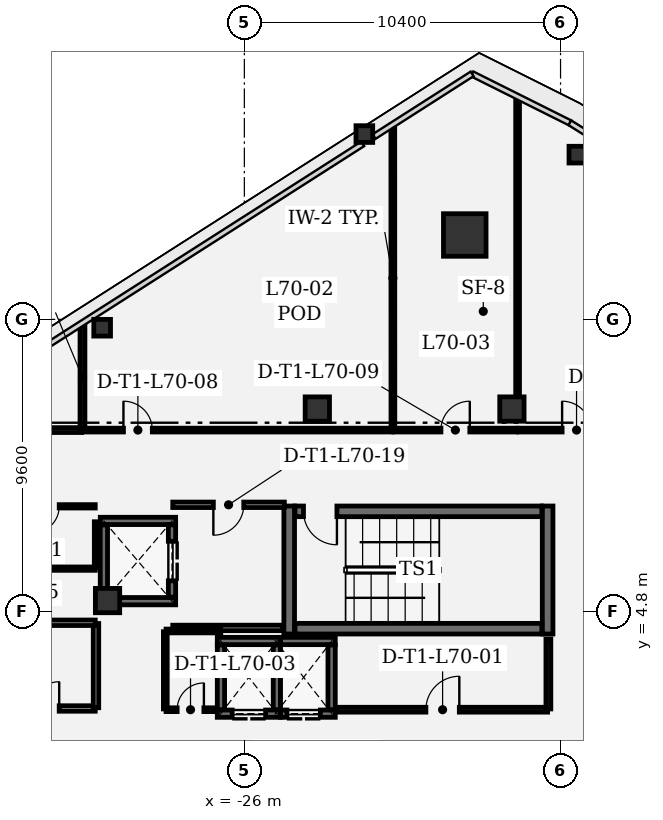
"""IFC4 building model, lengths in metres.
Left out: names, types, materials, properties, quantities, classifications, styles, units other than length and angle.
Written with IfcOpenShell. Run it as: python <this file> out.ifc"""

import sys

from ifc_helpers import new_model, si_unit, direction, frame, frame_2d, origin, origin_2d, place, context, subcontext, project, spatial, rectangle, extrude, element, fill, save


model = new_model("IFC4")
c1 = context("Model", 3, precision=1e-05, world=origin(), true_north=direction((0.0, 1.0)))
c2 = subcontext(c1, "Body", "Model", "MODEL_VIEW")
j1 = project(units=[si_unit("LENGTHUNIT", "METRE"), si_unit("PLANEANGLEUNIT", "RADIAN")], contexts=[c1])
p1 = place(None, origin())
s1 = spatial("IfcSite", under=j1, at=p1, CompositionType="ELEMENT")
p2 = place(p1, origin())
s2 = spatial("IfcBuilding", under=s1, at=p2, CompositionType="ELEMENT")
p3 = place(p2, frame((0.0, 0.0, 301.8)))
s3 = spatial("IfcBuildingStorey", under=s2, at=p3, CompositionType="ELEMENT", Elevation=301.8)
p4 = place(p3, frame((-18.75, 17.176, 0.0), z_axis=(0.0, 0.0, 1.0), x_axis=(1.0, 0.0, 0.0)))
e1 = element("IfcColumn", 1, at=p4, inside=s3, PredefinedType="COLUMN", context=c2, shape_type="SweptSolid", body=[
    extrude(rectangle(XDim=1.4, YDim=1.4, at=origin_2d()), origin(), (0.0, 0.0, 1.0), 4.2),
])
for number, where, z_axis, x_axis in (
    (2, (-23.6, 11.45, 0.0), (0.0, 0.0, 1.0), (1.0, 0.0, 0.0)),
    (3, (-17.2, 11.45, 0.0), (0.0, 0.0, 1.0), (1.0, 0.0, 0.0)),
    (4, (-30.5, 5.15, 0.0), (0.0, 0.0, 1.0), (1.0, 0.0, 0.0)),
):
    element("IfcColumn", number, at=place(p3, frame(where, z_axis=z_axis, x_axis=x_axis)), inside=s3, PredefinedType="COLUMN", context=c2, shape_type="SweptSolid", body=[
        extrude(rectangle(XDim=0.8, YDim=0.8, at=origin_2d()), origin(), (0.0, 0.0, 1.0), 4.2),
    ])
for number, where, z_axis, x_axis in (
    (5, (-22.053, 20.495, 0.0), (0.0, 0.0, 1.0), (1.0, 0.0, 0.0)),
    (6, (-30.677, 14.124, 0.0), (0.0, 0.0, 1.0), (1.0, 0.0, 0.0)),
    (7, (-15.046, 19.818, 0.0), (0.0, 0.0, 1.0), (1.0, 0.0, 0.0)),
):
    element("IfcColumn", number, at=place(p3, frame(where, z_axis=z_axis, x_axis=x_axis)), inside=s3, PredefinedType="COLUMN", context=c2, shape_type="SweptSolid", body=[
        extrude(rectangle(XDim=0.55, YDim=0.55, at=origin_2d()), origin(), (0.0, 0.0, 1.0), 4.2),
    ])
for number, where, z_axis, x_axis in (
    (8, (-24.525, 8.26, 0.0), (0.0, 0.0, 1.0), (0.0, -1.0, 0.0)),
    (9, (-16.025, 4.05, 0.0), (0.0, 0.0, 1.0), (0.0, 1.0, 0.0)),
):
    element("IfcWall", number, at=place(p3, frame(where, z_axis=z_axis, x_axis=x_axis)), inside=s3, PredefinedType="SHEAR", context=c2, shape_type="SweptSolid", body=[
        extrude(rectangle(XDim=4.21, YDim=0.35, at=frame_2d((2.105, 0.0))), origin(), (0.0, 0.0, 1.0), 3.91),
    ])
p5 = place(p3, frame((-24.335, 4.225, 0.0), z_axis=(0.0, 0.0, 1.0), x_axis=(1.0, 0.0, 0.0)))
e10 = element("IfcWall", 10, at=p5, inside=s3, PredefinedType="SHEAR", context=c2, shape_type="SweptSolid", body=[
    extrude(rectangle(XDim=8.12, YDim=0.35, at=frame_2d((4.06, 0.0))), origin(), (0.0, 0.0, 1.0), 3.91),
])
p6 = place(p3, frame((-16.215, 8.085, 0.0), z_axis=(0.0, 0.0, 1.0), x_axis=(-1.0, 0.0, 0.0)))
e11 = element("IfcWall", 11, at=p6, inside=s3, PredefinedType="SHEAR", context=c2, shape_type="SweptSolid", body=[
    extrude(rectangle(XDim=8.12, YDim=0.35, at=frame_2d((4.06, 0.0))), origin(), (0.0, 0.0, 1.0), 3.91),
])
p7 = place(p6, frame((6.74, 0.0, 0.0)))
e12 = element("IfcOpeningElement", 12, at=p7, cuts=e11, PredefinedType="OPENING", context=c2, shape_type="SweptSolid", body=[
    extrude(rectangle(XDim=1.1, YDim=2.2, at=frame_2d((0.55, 1.1))), frame((0.0, 0.185, 0.0), z_axis=(0.0, -1.0, 0.0), x_axis=(1.0, 0.0, 0.0)), (0.0, 0.0, 1.0), 0.37),
])
for number, where, z_axis, x_axis in (
    (13, (-28.26, 5.13, 0.0), (0.0, 0.0, 1.0), (-1.0, 0.0, 0.0)),
    (14, (-30.74, 7.77, 0.0), (0.0, 0.0, 1.0), (1.0, 0.0, 0.0)),
):
    element("IfcWall", number, at=place(p3, frame(where, z_axis=z_axis, x_axis=x_axis)), inside=s3, PredefinedType="SHEAR", context=c2, shape_type="SweptSolid", body=[
        extrude(rectangle(XDim=2.48, YDim=0.24, at=frame_2d((1.24, 0.0))), origin(), (0.0, 0.0, 1.0), 3.91),
    ])
p8 = place(p3, frame((-30.62, 5.262, 0.0), z_axis=(0.0, 0.0, 1.0), x_axis=(0.0, 1.0, 0.0)))
e15 = element("IfcWall", 15, at=p8, inside=s3, PredefinedType="SHEAR", context=c2, shape_type="SweptSolid", body=[
    extrude(rectangle(XDim=2.376, YDim=0.24, at=frame_2d((1.188, 0.0))), origin(), (0.0, 0.0, 1.0), 3.91),
])
p9 = place(p3, frame((-28.38, 7.638, 0.0), z_axis=(0.0, 0.0, 1.0), x_axis=(0.0, -1.0, 0.0)))
e16 = element("IfcWall", 16, at=p9, inside=s3, PredefinedType="SHEAR", context=c2, shape_type="SweptSolid", body=[
    extrude(rectangle(XDim=2.376, YDim=0.24, at=frame_2d((1.188, 0.0))), origin(), (0.0, 0.0, 1.0), 3.91),
])
p10 = place(p9, frame((0.538, 0.0, 0.0)))
e17 = element("IfcOpeningElement", 17, at=p10, cuts=e16, PredefinedType="OPENING", context=c2, shape_type="SweptSolid", body=[
    extrude(rectangle(XDim=1.3, YDim=2.3, at=frame_2d((0.65, 1.15))), frame((0.0, 0.13, 0.0), z_axis=(0.0, -1.0, 0.0), x_axis=(1.0, 0.0, 0.0)), (0.0, 0.0, 1.0), 0.26),
])
p11 = place(p3, frame((-24.81, 1.43, 0.0), z_axis=(0.0, 0.0, 1.0), x_axis=(-1.0, 0.0, 0.0)))
e18 = element("IfcWall", 18, at=p11, inside=s3, PredefinedType="SHEAR", context=c2, shape_type="SweptSolid", body=[
    extrude(rectangle(XDim=2.08, YDim=0.24, at=frame_2d((1.04, 0.0))), origin(), (0.0, 0.0, 1.0), 3.91),
])
p12 = place(p11, frame((0.49, 0.0, 0.0)))
e19 = element("IfcOpeningElement", 19, at=p12, cuts=e18, PredefinedType="OPENING", context=c2, shape_type="SweptSolid", body=[
    extrude(rectangle(XDim=1.1, YDim=2.2, at=frame_2d((0.55, 1.1))), frame((0.0, 0.13, 0.0), z_axis=(0.0, -1.0, 0.0), x_axis=(1.0, 0.0, 0.0)), (0.0, 0.0, 1.0), 0.26),
])
p13 = place(p3, frame((-26.89, 3.82, 0.0), z_axis=(0.0, 0.0, 1.0), x_axis=(1.0, 0.0, 0.0)))
e20 = element("IfcWall", 20, at=p13, inside=s3, PredefinedType="SHEAR", context=c2, shape_type="SweptSolid", body=[
    extrude(rectangle(XDim=2.08, YDim=0.24, at=frame_2d((1.04, 0.0))), origin(), (0.0, 0.0, 1.0), 3.91),
])
for number, where, z_axis, x_axis in (
    (21, (-26.77, 1.562, 0.0), (0.0, 0.0, 1.0), (0.0, 1.0, 0.0)),
    (22, (-24.93, 3.688, 0.0), (0.0, 0.0, 1.0), (0.0, -1.0, 0.0)),
):
    element("IfcWall", number, at=place(p3, frame(where, z_axis=z_axis, x_axis=x_axis)), inside=s3, PredefinedType="SHEAR", context=c2, shape_type="SweptSolid", body=[
        extrude(rectangle(XDim=2.126, YDim=0.24, at=frame_2d((1.063, 0.0))), origin(), (0.0, 0.0, 1.0), 3.91),
    ])
p14 = place(p3, frame((-23.01, 1.43, 0.0), z_axis=(0.0, 0.0, 1.0), x_axis=(-1.0, 0.0, 0.0)))
e23 = element("IfcWall", 23, at=p14, inside=s3, PredefinedType="SHEAR", context=c2, shape_type="SweptSolid", body=[
    extrude(rectangle(XDim=1.8, YDim=0.24, at=frame_2d((0.9, 0.0))), origin(), (0.0, 0.0, 1.0), 3.91),
])
p15 = place(p14, frame((0.49, 0.0, 0.0)))
e24 = element("IfcOpeningElement", 24, at=p15, cuts=e23, PredefinedType="OPENING", context=c2, shape_type="SweptSolid", body=[
    extrude(rectangle(XDim=1.1, YDim=2.2, at=frame_2d((0.55, 1.1))), frame((0.0, 0.13, 0.0), z_axis=(0.0, -1.0, 0.0), x_axis=(1.0, 0.0, 0.0)), (0.0, 0.0, 1.0), 0.26),
])
p16 = place(p3, frame((-24.81, 3.82, 0.0), z_axis=(0.0, 0.0, 1.0), x_axis=(1.0, 0.0, 0.0)))
e25 = element("IfcWall", 25, at=p16, inside=s3, PredefinedType="SHEAR", context=c2, shape_type="SweptSolid", body=[
    extrude(rectangle(XDim=1.8, YDim=0.24, at=frame_2d((0.9, 0.0))), origin(), (0.0, 0.0, 1.0), 3.91),
])
p17 = place(p3, frame((-23.13, 3.688, 0.0), z_axis=(0.0, 0.0, 1.0), x_axis=(0.0, -1.0, 0.0)))
e26 = element("IfcWall", 26, at=p17, inside=s3, PredefinedType="SHEAR", context=c2, shape_type="SweptSolid", body=[
    extrude(rectangle(XDim=2.126, YDim=0.24, at=frame_2d((1.063, 0.0))), origin(), (0.0, 0.0, 1.0), 3.91),
])
p18 = place(p3, frame((-28.355, 4.25, 0.0), z_axis=(0.0, 0.0, 1.0), x_axis=(1.0, 0.0, 0.0)))
e27 = element("IfcWall", 27, at=p18, inside=s3, PredefinedType="PARTITIONING", context=c2, shape_type="SweptSolid", body=[
    extrude(rectangle(XDim=3.622, YDim=0.18, at=frame_2d((1.811, 0.0))), origin(), (0.0, 0.0, 1.0), 3.91),
])
p19 = place(p3, frame((-24.684, 8.3, 0.0), z_axis=(0.0, 0.0, 1.0), x_axis=(-1.0, 0.0, 0.0)))
e28 = element("IfcWall", 28, at=p19, inside=s3, PredefinedType="PARTITIONING", context=c2, shape_type="SweptSolid", body=[
    extrude(rectangle(XDim=3.671, YDim=0.18, at=frame_2d((1.835, 0.0))), origin(), (0.0, 0.0, 1.0), 3.529),
])
p20 = place(p19, frame((1.335, 0.0, 0.0)))
e29 = element("IfcOpeningElement", 29, at=p20, cuts=e28, PredefinedType="OPENING", context=c2, shape_type="SweptSolid", body=[
    extrude(rectangle(XDim=1.0, YDim=2.15, at=frame_2d((0.5, 1.075))), frame((0.0, 0.1, 0.0), z_axis=(0.0, -1.0, 0.0), x_axis=(1.0, 0.0, 0.0)), (0.0, 0.0, 1.0), 0.2),
])
p21 = place(p3, frame((-34.155, 6.2, 0.0), z_axis=(0.0, 0.0, 1.0), x_axis=(1.0, 0.0, 0.0)))
e30 = element("IfcWall", 30, at=p21, inside=s3, PredefinedType="PARTITIONING", context=c2, shape_type="SweptSolid", body=[
    extrude(rectangle(XDim=3.25, YDim=0.11, at=frame_2d((1.625, 0.0))), origin(), (0.0, 0.0, 1.0), 3.529),
])
p22 = place(p3, frame((-30.88, 6.225, 0.0), z_axis=(0.0, 0.0, 1.0), x_axis=(0.0, 1.0, 0.0)))
e31 = element("IfcWall", 31, at=p22, inside=s3, PredefinedType="PARTITIONING", context=c2, shape_type="SweptSolid", body=[
    extrude(rectangle(XDim=1.518, YDim=0.11, at=frame_2d((0.759, 0.0))), origin(), (0.0, 0.0, 1.0), 3.91),
])
p23 = place(p3, frame((-30.905, 8.25, 0.0), z_axis=(0.0, 0.0, 1.0), x_axis=(-1.0, 0.0, 0.0)))
e32 = element("IfcWall", 32, at=p23, inside=s3, PredefinedType="PARTITIONING", context=c2, shape_type="SweptSolid", body=[
    extrude(rectangle(XDim=3.25, YDim=0.11, at=frame_2d((1.625, 0.0))), origin(), (0.0, 0.0, 1.0), 3.13),
])
p24 = place(p23, frame((1.185, 0.0, 0.0)))
e33 = element("IfcOpeningElement", 33, at=p24, cuts=e32, PredefinedType="OPENING", context=c2, shape_type="SweptSolid", body=[
    extrude(rectangle(XDim=0.88, YDim=2.1, at=frame_2d((0.44, 1.05))), frame((0.0, 0.065, 0.0), z_axis=(0.0, -1.0, 0.0), x_axis=(1.0, 0.0, 0.0)), (0.0, 0.0, 1.0), 0.13),
])
p25 = place(p3, frame((-22.934, 1.56, 0.0), z_axis=(0.0, 0.0, 1.0), x_axis=(1.0, 0.0, 0.0)))
e34 = element("IfcWall", 34, at=p25, inside=s3, PredefinedType="PARTITIONING", context=c2, shape_type="SweptSolid", body=[
    extrude(rectangle(XDim=6.909, YDim=0.16, at=frame_2d((3.455, 0.0))), origin(), (0.0, 0.0, 1.0), 3.91),
])
p26 = place(p25, frame((2.905, 0.0, 0.0)))
e35 = element("IfcOpeningElement", 35, at=p26, cuts=e34, PredefinedType="OPENING", context=c2, shape_type="SweptSolid", body=[
    extrude(rectangle(XDim=1.1, YDim=2.15, at=frame_2d((0.55, 1.075))), frame((0.0, 0.09, 0.0), z_axis=(0.0, -1.0, 0.0), x_axis=(1.0, 0.0, 0.0)), (0.0, 0.0, 1.0), 0.18),
])
p27 = place(p3, frame((-16.0, 1.585, 0.0), z_axis=(0.0, 0.0, 1.0), x_axis=(0.0, 1.0, 0.0)))
e36 = element("IfcWall", 36, at=p27, inside=s3, PredefinedType="PARTITIONING", context=c2, shape_type="SweptSolid", body=[
    extrude(rectangle(XDim=2.302, YDim=0.16, at=frame_2d((1.151, 0.0))), origin(), (0.0, 0.0, 1.0), 3.91),
])
p28 = place(p3, frame((-28.6, 4.125, 0.0), z_axis=(0.0, 0.0, 1.0), x_axis=(0.0, -1.0, 0.0)))
e37 = element("IfcWall", 37, at=p28, inside=s3, PredefinedType="PARTITIONING", context=c2, shape_type="SweptSolid", body=[
    extrude(rectangle(XDim=2.54, YDim=0.125, at=frame_2d((1.27, 0.0))), origin(), (0.0, 0.0, 1.0), 3.91),
])
p29 = place(p3, frame((-28.575, 1.56, 0.0), z_axis=(0.0, 0.0, 1.0), x_axis=(1.0, 0.0, 0.0)))
e38 = element("IfcWall", 38, at=p29, inside=s3, PredefinedType="PARTITIONING", context=c2, shape_type="SweptSolid", body=[
    extrude(rectangle(XDim=1.609, YDim=0.125, at=frame_2d((0.805, 0.0))), origin(), (0.0, 0.0, 1.0), 3.91),
])
p30 = place(p29, frame((0.365, 0.0, 0.0)))
e39 = element("IfcOpeningElement", 39, at=p30, cuts=e38, PredefinedType="OPENING", context=c2, shape_type="SweptSolid", body=[
    extrude(rectangle(XDim=0.88, YDim=2.1, at=frame_2d((0.44, 1.05))), frame((0.0, 0.073, 0.0), z_axis=(0.0, -1.0, 0.0), x_axis=(1.0, 0.0, 0.0)), (0.0, 0.0, 1.0), 0.145),
])
p31 = place(p3, frame((-26.775, 4.15, 0.0), z_axis=(0.0, 0.0, 1.0), x_axis=(-1.0, 0.0, 0.0)))
e40 = element("IfcWall", 40, at=p31, inside=s3, PredefinedType="PARTITIONING", context=c2, shape_type="SweptSolid", body=[
    extrude(rectangle(XDim=1.8, YDim=0.125, at=frame_2d((0.9, 0.0))), origin(), (0.0, 0.0, 1.0), 3.91),
])
p32 = place(p3, frame((-34.155, 1.6, 0.0), z_axis=(0.0, 0.0, 1.0), x_axis=(1.0, 0.0, 0.0)))
e41 = element("IfcWall", 41, at=p32, inside=s3, PredefinedType="PARTITIONING", context=c2, shape_type="SweptSolid", body=[
    extrude(rectangle(XDim=3.25, YDim=0.18, at=frame_2d((1.625, 0.0))), origin(), (0.0, 0.0, 1.0), 3.91),
])
p33 = place(p32, frame((1.185, 0.0, 0.0)))
e42 = element("IfcOpeningElement", 42, at=p33, cuts=e41, PredefinedType="OPENING", context=c2, shape_type="SweptSolid", body=[
    extrude(rectangle(XDim=0.88, YDim=2.1, at=frame_2d((0.44, 1.05))), frame((0.0, 0.1, 0.0), z_axis=(0.0, -1.0, 0.0), x_axis=(1.0, 0.0, 0.0)), (0.0, 0.0, 1.0), 0.2),
])
p34 = place(p3, frame((-30.88, 1.625, 0.0), z_axis=(0.0, 0.0, 1.0), x_axis=(0.0, 1.0, 0.0)))
e43 = element("IfcWall", 43, at=p34, inside=s3, PredefinedType="PARTITIONING", context=c2, shape_type="SweptSolid", body=[
    extrude(rectangle(XDim=2.77, YDim=0.18, at=frame_2d((1.385, 0.0))), origin(), (0.0, 0.0, 1.0), 3.91),
])
p35 = place(p3, frame((-30.905, 4.42, 0.0), z_axis=(0.0, 0.0, 1.0), x_axis=(-1.0, 0.0, 0.0)))
e44 = element("IfcWall", 44, at=p35, inside=s3, PredefinedType="PARTITIONING", context=c2, shape_type="SweptSolid", body=[
    extrude(rectangle(XDim=1.975, YDim=0.18, at=frame_2d((0.988, 0.0))), origin(), (0.0, 0.0, 1.0), 3.91),
])
p36 = place(p3, frame((-31.35, 10.758, 0.0), z_axis=(0.0, 0.0, 1.0), x_axis=(-1.0, 0.0, 0.0)))
e45 = element("IfcWall", 45, at=p36, inside=s3, PredefinedType="PARTITIONING", context=c2, shape_type="SweptSolid", body=[
    extrude(rectangle(XDim=5.41, YDim=0.16, at=frame_2d((2.705, 0.0))), origin(), (0.0, 0.0, 1.0), 3.91),
])
p37 = place(p36, frame((2.155, 0.0, 0.0)))
e46 = element("IfcOpeningElement", 46, at=p37, cuts=e45, PredefinedType="OPENING", context=c2, shape_type="SweptSolid", body=[
    extrude(rectangle(XDim=1.1, YDim=2.15, at=frame_2d((0.55, 1.075))), frame((0.0, 0.09, 0.0), z_axis=(0.0, -1.0, 0.0), x_axis=(1.0, 0.0, 0.0)), (0.0, 0.0, 1.0), 0.18),
])
p38 = place(p3, frame((-31.324, 10.783, 0.0), z_axis=(0.0, 0.0, 1.0), x_axis=(0.0, 1.0, 0.0)))
e47 = element("IfcWall", 47, at=p38, inside=s3, PredefinedType="PARTITIONING", context=c2, shape_type="SweptSolid", body=[
    extrude(rectangle(XDim=3.42, YDim=0.16, at=frame_2d((1.71, 0.0))), origin(), (0.0, 0.0, 1.0), 3.91),
])
p39 = place(p3, frame((-31.292, 10.758, 0.0), z_axis=(0.0, 0.0, 1.0), x_axis=(1.0, 0.0, 0.0)))
e48 = element("IfcWall", 48, at=p39, inside=s3, PredefinedType="PARTITIONING", context=c2, shape_type="SweptSolid", body=[
    extrude(rectangle(XDim=10.153, YDim=0.125, at=frame_2d((5.076, 0.0))), origin(), (0.0, 0.0, 1.0), 3.13),
])
p40 = place(p39, frame((1.315, 0.0, 0.0)))
e49 = element("IfcOpeningElement", 49, at=p40, cuts=e48, PredefinedType="OPENING", context=c2, shape_type="SweptSolid", body=[
    extrude(rectangle(XDim=0.95, YDim=2.15, at=frame_2d((0.475, 1.075))), frame((0.0, 0.073, 0.0), z_axis=(0.0, -1.0, 0.0), x_axis=(1.0, 0.0, 0.0)), (0.0, 0.0, 1.0), 0.145),
])
p41 = place(p3, frame((-21.114, 10.783, 0.0), z_axis=(0.0, 0.0, 1.0), x_axis=(-0.000319175039, 0.999999949064, 0.0)))
e50 = element("IfcWall", 50, at=p41, inside=s3, PredefinedType="PARTITIONING", context=c2, shape_type="SweptSolid", body=[
    extrude(rectangle(XDim=9.944, YDim=0.125, at=frame_2d((4.972, 0.0))), origin(), (0.0, 0.0, 1.0), 3.91),
])
p42 = place(p3, frame((-21.081, 10.758, 0.0), z_axis=(0.0, 0.0, 1.0), x_axis=(1.0, 0.0, 0.0)))
e51 = element("IfcWall", 51, at=p42, inside=s3, PredefinedType="PARTITIONING", context=c2, shape_type="SweptSolid", body=[
    extrude(rectangle(XDim=4.043, YDim=0.125, at=frame_2d((2.021, 0.0))), origin(), (0.0, 0.0, 1.0), 3.529),
])
p43 = place(p42, frame((1.546, 0.0, 0.0)))
e52 = element("IfcOpeningElement", 52, at=p43, cuts=e51, PredefinedType="OPENING", context=c2, shape_type="SweptSolid", body=[
    extrude(rectangle(XDim=0.95, YDim=2.15, at=frame_2d((0.475, 1.075))), frame((0.0, 0.073, 0.0), z_axis=(0.0, -1.0, 0.0), x_axis=(1.0, 0.0, 0.0)), (0.0, 0.0, 1.0), 0.145),
])
p44 = place(p3, frame((-17.013, 11.915, 0.0), z_axis=(0.0, 0.0, 1.0), x_axis=(0.0, 1.0, 0.0)))
e53 = element("IfcWall", 53, at=p44, inside=s3, PredefinedType="PARTITIONING", context=c2, shape_type="SweptSolid", body=[
    extrude(rectangle(XDim=9.731, YDim=0.125, at=frame_2d((4.866, 0.0))), origin(), (0.0, 0.0, 1.0), 3.13),
])
p45 = place(p3, frame((-16.98, 10.758, 0.0), z_axis=(0.0, 0.0, 1.0), x_axis=(1.0, 0.0, 0.0)))
e54 = element("IfcWall", 54, at=p45, inside=s3, PredefinedType="PARTITIONING", context=c2, shape_type="SweptSolid", body=[
    extrude(rectangle(XDim=3.813, YDim=0.125, at=frame_2d((1.906, 0.0))), origin(), (0.0, 0.0, 1.0), 3.91),
])
p46 = place(p45, frame((1.431, 0.0, 0.0)))
e55 = element("IfcOpeningElement", 55, at=p46, cuts=e54, PredefinedType="OPENING", context=c2, shape_type="SweptSolid", body=[
    extrude(rectangle(XDim=0.95, YDim=2.15, at=frame_2d((0.475, 1.075))), frame((0.0, 0.073, 0.0), z_axis=(0.0, -1.0, 0.0), x_axis=(1.0, 0.0, 0.0)), (0.0, 0.0, 1.0), 0.145),
])
p47 = place(p7, origin())
e56 = element("IfcDoor", 56, at=p47, inside=s3, OperationType="SINGLE_SWING_LEFT", PredefinedType="DOOR", context=c2, shape_type="SweptSolid", body=[
    extrude(rectangle(XDim=1.1, YDim=2.2, at=frame_2d((0.55, 1.1))), frame((0.0, 0.025, 0.0), z_axis=(0.0, -1.0, 0.0), x_axis=(1.0, 0.0, 0.0)), (0.0, 0.0, 1.0), 0.05),
])
fill(e12, e56)
p48 = place(p10, origin())
e57 = element("IfcDoor", 57, at=p48, inside=s3, OperationType="DOUBLE_DOOR_SLIDING", PredefinedType="DOOR", context=c2, shape_type="SweptSolid", body=[
    extrude(rectangle(XDim=1.3, YDim=2.3, at=frame_2d((0.65, 1.15))), frame((0.0, 0.025, 0.0), z_axis=(0.0, -1.0, 0.0), x_axis=(1.0, 0.0, 0.0)), (0.0, 0.0, 1.0), 0.05),
])
fill(e17, e57)
p49 = place(p12, origin())
e58 = element("IfcDoor", 58, at=p49, inside=s3, OperationType="DOUBLE_DOOR_SLIDING", PredefinedType="DOOR", context=c2, shape_type="SweptSolid", body=[
    extrude(rectangle(XDim=1.1, YDim=2.2, at=frame_2d((0.55, 1.1))), frame((0.0, 0.025, 0.0), z_axis=(0.0, -1.0, 0.0), x_axis=(1.0, 0.0, 0.0)), (0.0, 0.0, 1.0), 0.05),
])
fill(e19, e58)
p50 = place(p15, origin())
e59 = element("IfcDoor", 59, at=p50, inside=s3, OperationType="DOUBLE_DOOR_SLIDING", PredefinedType="DOOR", context=c2, shape_type="SweptSolid", body=[
    extrude(rectangle(XDim=1.1, YDim=2.2, at=frame_2d((0.55, 1.1))), frame((0.0, 0.025, 0.0), z_axis=(0.0, -1.0, 0.0), x_axis=(1.0, 0.0, 0.0)), (0.0, 0.0, 1.0), 0.05),
])
fill(e24, e59)
p51 = place(p26, origin())
e60 = element("IfcDoor", 60, at=p51, inside=s3, OperationType="SINGLE_SWING_RIGHT", PredefinedType="DOOR", context=c2, shape_type="SweptSolid", body=[
    extrude(rectangle(XDim=1.1, YDim=2.15, at=frame_2d((0.55, 1.075))), frame((0.0, 0.025, 0.0), z_axis=(0.0, -1.0, 0.0), x_axis=(1.0, 0.0, 0.0)), (0.0, 0.0, 1.0), 0.05),
])
fill(e35, e60)
p52 = place(p30, origin())
e61 = element("IfcDoor", 61, at=p52, inside=s3, OperationType="SINGLE_SWING_RIGHT", PredefinedType="DOOR", context=c2, shape_type="SweptSolid", body=[
    extrude(rectangle(XDim=0.88, YDim=2.1, at=frame_2d((0.44, 1.05))), frame((0.0, 0.025, 0.0), z_axis=(0.0, -1.0, 0.0), x_axis=(1.0, 0.0, 0.0)), (0.0, 0.0, 1.0), 0.05),
])
fill(e39, e61)
p53 = place(p33, origin())
e62 = element("IfcDoor", 62, at=p53, inside=s3, OperationType="SINGLE_SWING_RIGHT", PredefinedType="DOOR", context=c2, shape_type="SweptSolid", body=[
    extrude(rectangle(XDim=0.88, YDim=2.1, at=frame_2d((0.44, 1.05))), frame((0.0, 0.025, 0.0), z_axis=(0.0, -1.0, 0.0), x_axis=(1.0, 0.0, 0.0)), (0.0, 0.0, 1.0), 0.05),
])
fill(e42, e62)
p54 = place(p40, origin())
e63 = element("IfcDoor", 63, at=p54, inside=s3, OperationType="SINGLE_SWING_LEFT", PredefinedType="DOOR", context=c2, shape_type="SweptSolid", body=[
    extrude(rectangle(XDim=0.95, YDim=2.15, at=frame_2d((0.475, 1.075))), frame((0.0, 0.025, 0.0), z_axis=(0.0, -1.0, 0.0), x_axis=(1.0, 0.0, 0.0)), (0.0, 0.0, 1.0), 0.05),
])
fill(e49, e63)
p55 = place(p43, origin())
e64 = element("IfcDoor", 64, at=p55, inside=s3, OperationType="SINGLE_SWING_RIGHT", PredefinedType="DOOR", context=c2, shape_type="SweptSolid", body=[
    extrude(rectangle(XDim=0.95, YDim=2.15, at=frame_2d((0.475, 1.075))), frame((0.0, 0.025, 0.0), z_axis=(0.0, -1.0, 0.0), x_axis=(1.0, 0.0, 0.0)), (0.0, 0.0, 1.0), 0.05),
])
fill(e52, e64)
p56 = place(p46, origin())
e65 = element("IfcDoor", 65, at=p56, inside=s3, OperationType="SINGLE_SWING_LEFT", PredefinedType="DOOR", context=c2, shape_type="SweptSolid", body=[
    extrude(rectangle(XDim=0.95, YDim=2.15, at=frame_2d((0.475, 1.075))), frame((0.0, 0.025, 0.0), z_axis=(0.0, -1.0, 0.0), x_axis=(1.0, 0.0, 0.0)), (0.0, 0.0, 1.0), 0.05),
])
fill(e55, e65)
p57 = place(p20, origin())
e66 = element("IfcDoor", 66, at=p57, inside=s3, OperationType="SINGLE_SWING_RIGHT", PredefinedType="DOOR", context=c2, shape_type="SweptSolid", body=[
    extrude(rectangle(XDim=1.0, YDim=2.15, at=frame_2d((0.5, 1.075))), frame((0.0, 0.025, 0.0), z_axis=(0.0, -1.0, 0.0), x_axis=(1.0, 0.0, 0.0)), (0.0, 0.0, 1.0), 0.05),
])
fill(e29, e66)
p58 = place(p24, origin())
e67 = element("IfcDoor", 67, at=p58, inside=s3, OperationType="SINGLE_SWING_RIGHT", PredefinedType="DOOR", context=c2, shape_type="SweptSolid", body=[
    extrude(rectangle(XDim=0.88, YDim=2.1, at=frame_2d((0.44, 1.05))), frame((0.0, 0.025, 0.0), z_axis=(0.0, -1.0, 0.0), x_axis=(1.0, 0.0, 0.0)), (0.0, 0.0, 1.0), 0.05),
])
fill(e33, e67)
save(model, sys.argv[1])
